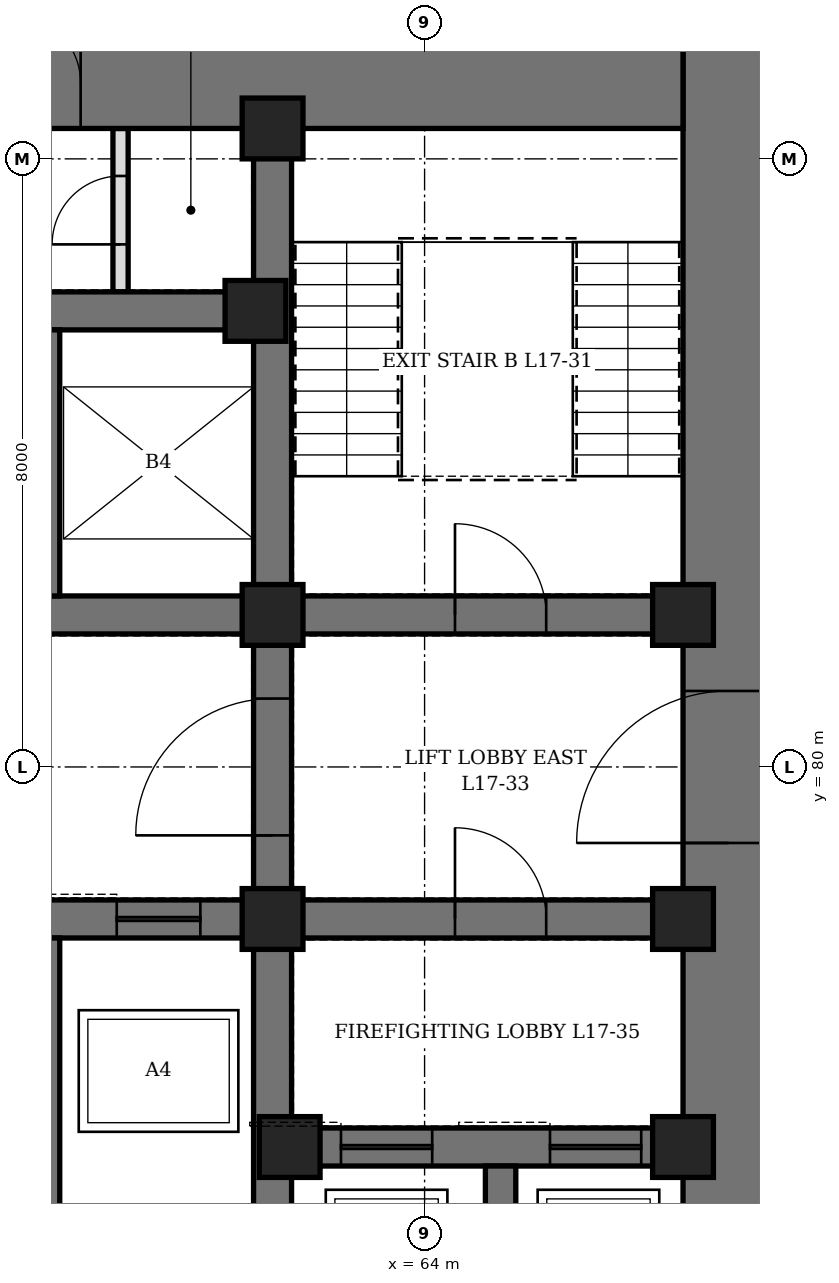
"""IFC4 building model, lengths in metres.
Left out: names, types, materials, properties, quantities, classifications, styles, units other than length and angle.
Written with IfcOpenShell. Run it as: python <this file> out.ifc"""

import sys

from ifc_helpers import new_model, si_unit, direction, frame, frame_2d, origin, origin_2d, place, context, subcontext, project, spatial, rectangle, hollow_rectangle, extrude, element, fill, save


model = new_model("IFC4")
c1 = context("Model", 3, precision=1e-05, world=origin(), true_north=direction((0.0, 1.0)))
c2 = subcontext(c1, "Body", "Model", "MODEL_VIEW")
j1 = project(units=[si_unit("LENGTHUNIT", "METRE"), si_unit("PLANEANGLEUNIT", "RADIAN")], contexts=[c1])
p1 = place(None, origin())
s1 = spatial("IfcSite", under=j1, at=p1, CompositionType="ELEMENT")
p2 = place(p1, origin())
s2 = spatial("IfcBuilding", under=s1, at=p2, CompositionType="ELEMENT")
p3 = place(p2, frame((0.0, 0.0, 81.1)))
s3 = spatial("IfcBuildingStorey", under=s2, at=p3, CompositionType="ELEMENT", Elevation=81.1)
p4 = place(p3, frame((68.0, 70.4, 0.0), z_axis=(0.0, 0.0, 1.0), x_axis=(0.0, 1.0, 0.0)))
e1 = element("IfcWall", 1, at=p4, inside=s3, PredefinedType="SHEAR", context=c2, shape_type="SweptSolid", body=[
    extrude(rectangle(XDim=19.2, YDim=1.2, at=frame_2d((9.6, 0.0))), origin(), (0.0, 0.0, 1.0), 4.2),
])
p5 = place(p4, frame((8.6, 0.0, 0.0)))
e2 = element("IfcOpeningElement", 2, at=p5, cuts=e1, PredefinedType="OPENING", context=c2, shape_type="SweptSolid", body=[
    extrude(rectangle(XDim=2.0, YDim=2.4, at=frame_2d((1.0, 1.2))), frame((0.0, 0.61, 0.0), z_axis=(0.0, -1.0, 0.0), x_axis=(1.0, 0.0, 0.0)), (0.0, 0.0, 1.0), 1.22),
])
p6 = place(p3, frame((44.6, 89.0, 0.0), z_axis=(0.0, 0.0, 1.0), x_axis=(1.0, 0.0, 0.0)))
e3 = element("IfcWall", 3, at=p6, inside=s3, PredefinedType="SHEAR", context=c2, shape_type="SweptSolid", body=[
    extrude(rectangle(XDim=22.8, YDim=1.2, at=frame_2d((11.4, 0.0))), origin(), (0.0, 0.0, 1.0), 4.2),
])
p7 = place(p6, frame((6.55, 0.0, 0.0)))
e4 = element("IfcOpeningElement", 4, at=p7, cuts=e3, PredefinedType="OPENING", context=c2, shape_type="SweptSolid", body=[
    extrude(rectangle(XDim=1.0, YDim=2.1, at=frame_2d((0.5, 1.05))), frame((0.0, 0.61, 0.0), z_axis=(0.0, -1.0, 0.0), x_axis=(1.0, 0.0, 0.0)), (0.0, 0.0, 1.0), 1.22),
])
p8 = place(p6, frame((9.45, 0.0, 0.0)))
e5 = element("IfcOpeningElement", 5, at=p8, cuts=e3, PredefinedType="OPENING", context=c2, shape_type="SweptSolid", body=[
    extrude(rectangle(XDim=0.9, YDim=2.1, at=frame_2d((0.45, 1.05))), frame((0.0, 0.61, 0.0), z_axis=(0.0, -1.0, 0.0), x_axis=(1.0, 0.0, 0.0)), (0.0, 0.0, 1.0), 1.22),
])
p9 = place(p6, frame((12.05, 0.0, 0.0)))
e6 = element("IfcOpeningElement", 6, at=p9, cuts=e3, PredefinedType="OPENING", context=c2, shape_type="SweptSolid", body=[
    extrude(rectangle(XDim=0.9, YDim=2.1, at=frame_2d((0.45, 1.05))), frame((0.0, 0.61, 0.0), z_axis=(0.0, -1.0, 0.0), x_axis=(1.0, 0.0, 0.0)), (0.0, 0.0, 1.0), 1.22),
])
p10 = place(p6, frame((13.975, 0.0, 0.0)))
e7 = element("IfcOpeningElement", 7, at=p10, cuts=e3, PredefinedType="OPENING", context=c2, shape_type="SweptSolid", body=[
    extrude(rectangle(XDim=0.9, YDim=2.1, at=frame_2d((0.45, 1.05))), frame((0.0, 0.61, 0.0), z_axis=(0.0, -1.0, 0.0), x_axis=(1.0, 0.0, 0.0)), (0.0, 0.0, 1.0), 1.22),
])
p11 = place(p3, frame((62.0, 71.6, 0.0), z_axis=(0.0, 0.0, 1.0), x_axis=(0.0, 1.0, 0.0)))
e8 = element("IfcWall", 8, at=p11, inside=s3, PredefinedType="SHEAR", context=c2, shape_type="SweptSolid", body=[
    extrude(rectangle(XDim=16.8, YDim=0.5, at=frame_2d((8.4, 0.0))), origin(), (0.0, 0.0, 1.0), 4.2),
])
p12 = place(p11, frame((7.5, 0.0, 0.0)))
e9 = element("IfcOpeningElement", 9, at=p12, cuts=e8, PredefinedType="OPENING", context=c2, shape_type="SweptSolid", body=[
    extrude(rectangle(XDim=1.8, YDim=2.4, at=frame_2d((0.9, 1.2))), frame((0.0, 0.26, 0.0), z_axis=(0.0, -1.0, 0.0), x_axis=(1.0, 0.0, 0.0)), (0.0, 0.0, 1.0), 0.52),
])
p13 = place(p3, frame((62.25, 75.0, 0.0), z_axis=(0.0, 0.0, 1.0), x_axis=(1.0, 0.0, 0.0)))
e10 = element("IfcWall", 10, at=p13, inside=s3, PredefinedType="SHEAR", context=c2, shape_type="SweptSolid", body=[
    extrude(rectangle(XDim=5.15, YDim=0.5, at=frame_2d((2.575, 0.0))), origin(), (0.0, 0.0, 1.0), 4.2),
])
p14 = place(p13, frame((0.65, 0.0, 0.0)))
e11 = element("IfcOpeningElement", 11, at=p14, cuts=e10, PredefinedType="OPENING", context=c2, shape_type="SweptSolid", body=[
    extrude(rectangle(XDim=1.2, YDim=2.2, at=frame_2d((0.6, 1.1))), frame((0.0, 0.26, 0.0), z_axis=(0.0, -1.0, 0.0), x_axis=(1.0, 0.0, 0.0)), (0.0, 0.0, 1.0), 0.52),
])
p15 = place(p13, frame((3.4, 0.0, 0.0)))
e12 = element("IfcOpeningElement", 12, at=p15, cuts=e10, PredefinedType="OPENING", context=c2, shape_type="SweptSolid", body=[
    extrude(rectangle(XDim=1.2, YDim=2.2, at=frame_2d((0.6, 1.1))), frame((0.0, 0.26, 0.0), z_axis=(0.0, -1.0, 0.0), x_axis=(1.0, 0.0, 0.0)), (0.0, 0.0, 1.0), 0.52),
])
p16 = place(p3, frame((62.25, 78.0, 0.0), z_axis=(0.0, 0.0, 1.0), x_axis=(1.0, 0.0, 0.0)))
e13 = element("IfcWall", 13, at=p16, inside=s3, PredefinedType="SHEAR", context=c2, shape_type="SweptSolid", body=[
    extrude(rectangle(XDim=5.15, YDim=0.5, at=frame_2d((2.575, 0.0))), origin(), (0.0, 0.0, 1.0), 4.2),
])
p17 = place(p16, frame((2.15, 0.0, 0.0)))
e14 = element("IfcOpeningElement", 14, at=p17, cuts=e13, PredefinedType="OPENING", context=c2, shape_type="SweptSolid", body=[
    extrude(rectangle(XDim=1.2, YDim=2.1, at=frame_2d((0.6, 1.05))), frame((0.0, 0.26, 0.0), z_axis=(0.0, -1.0, 0.0), x_axis=(1.0, 0.0, 0.0)), (0.0, 0.0, 1.0), 0.52),
])
p18 = place(p3, frame((62.25, 82.0, 0.0), z_axis=(0.0, 0.0, 1.0), x_axis=(1.0, 0.0, 0.0)))
e15 = element("IfcWall", 15, at=p18, inside=s3, PredefinedType="SHEAR", context=c2, shape_type="SweptSolid", body=[
    extrude(rectangle(XDim=5.15, YDim=0.5, at=frame_2d((2.575, 0.0))), origin(), (0.0, 0.0, 1.0), 4.2),
])
p19 = place(p18, frame((2.15, 0.0, 0.0)))
e16 = element("IfcOpeningElement", 16, at=p19, cuts=e15, PredefinedType="OPENING", context=c2, shape_type="SweptSolid", body=[
    extrude(rectangle(XDim=1.2, YDim=2.1, at=frame_2d((0.6, 1.05))), frame((0.0, 0.26, 0.0), z_axis=(0.0, -1.0, 0.0), x_axis=(1.0, 0.0, 0.0)), (0.0, 0.0, 1.0), 0.52),
])
p20 = place(p3, frame((50.25, 78.0, 0.0), z_axis=(0.0, 0.0, 1.0), x_axis=(1.0, 0.0, 0.0)))
e17 = element("IfcWall", 17, at=p20, inside=s3, PredefinedType="SHEAR", context=c2, shape_type="SweptSolid", body=[
    extrude(rectangle(XDim=11.5, YDim=0.5, at=frame_2d((5.75, 0.0))), origin(), (0.0, 0.0, 1.0), 4.2),
])
p21 = place(p20, frame((0.7, 0.0, 0.0)))
e18 = element("IfcOpeningElement", 18, at=p21, cuts=e17, PredefinedType="OPENING", context=c2, shape_type="SweptSolid", body=[
    extrude(rectangle(XDim=1.1, YDim=2.2, at=frame_2d((0.55, 1.1))), frame((0.0, 0.26, 0.0), z_axis=(0.0, -1.0, 0.0), x_axis=(1.0, 0.0, 0.0)), (0.0, 0.0, 1.0), 0.52),
])
p22 = place(p20, frame((3.7, 0.0, 0.0)))
e19 = element("IfcOpeningElement", 19, at=p22, cuts=e17, PredefinedType="OPENING", context=c2, shape_type="SweptSolid", body=[
    extrude(rectangle(XDim=1.1, YDim=2.2, at=frame_2d((0.55, 1.1))), frame((0.0, 0.26, 0.0), z_axis=(0.0, -1.0, 0.0), x_axis=(1.0, 0.0, 0.0)), (0.0, 0.0, 1.0), 0.52),
])
p23 = place(p20, frame((6.7, 0.0, 0.0)))
e20 = element("IfcOpeningElement", 20, at=p23, cuts=e17, PredefinedType="OPENING", context=c2, shape_type="SweptSolid", body=[
    extrude(rectangle(XDim=1.1, YDim=2.2, at=frame_2d((0.55, 1.1))), frame((0.0, 0.26, 0.0), z_axis=(0.0, -1.0, 0.0), x_axis=(1.0, 0.0, 0.0)), (0.0, 0.0, 1.0), 0.52),
])
p24 = place(p20, frame((9.7, 0.0, 0.0)))
e21 = element("IfcOpeningElement", 21, at=p24, cuts=e17, PredefinedType="OPENING", context=c2, shape_type="SweptSolid", body=[
    extrude(rectangle(XDim=1.1, YDim=2.2, at=frame_2d((0.55, 1.1))), frame((0.0, 0.26, 0.0), z_axis=(0.0, -1.0, 0.0), x_axis=(1.0, 0.0, 0.0)), (0.0, 0.0, 1.0), 0.52),
])
for number, where, z_axis, x_axis in (
    (22, (50.25, 82.0, 0.0), (0.0, 0.0, 1.0), (1.0, 0.0, 0.0)),
    (23, (50.25, 86.0, 0.0), (0.0, 0.0, 1.0), (1.0, 0.0, 0.0)),
):
    element("IfcWall", number, at=place(p3, frame(where, z_axis=z_axis, x_axis=x_axis)), inside=s3, PredefinedType="SHEAR", context=c2, shape_type="SweptSolid", body=[
        extrude(rectangle(XDim=11.5, YDim=0.5, at=frame_2d((5.75, 0.0))), origin(), (0.0, 0.0, 1.0), 4.2),
    ])
p25 = place(p3, frame((59.0, 74.2, 0.0), z_axis=(0.0, 0.0, 1.0), x_axis=(0.0, 1.0, 0.0)))
e24 = element("IfcWall", 24, at=p25, inside=s3, PredefinedType="SHEAR", context=c2, shape_type="SweptSolid", body=[
    extrude(rectangle(XDim=3.55, YDim=0.4, at=frame_2d((1.775, 0.0))), origin(), (0.0, 0.0, 1.0), 4.2),
])
p26 = place(p3, frame((59.0, 82.25, 0.0), z_axis=(0.0, 0.0, 1.0), x_axis=(0.0, 1.0, 0.0)))
e25 = element("IfcWall", 25, at=p26, inside=s3, PredefinedType="SHEAR", context=c2, shape_type="SweptSolid", body=[
    extrude(rectangle(XDim=3.5, YDim=0.4, at=frame_2d((1.75, 0.0))), origin(), (0.0, 0.0, 1.0), 4.2),
])
p27 = place(p3, frame((65.0, 71.6, 0.0), z_axis=(0.0, 0.0, 1.0), x_axis=(0.0, 1.0, 0.0)))
e26 = element("IfcWall", 26, at=p27, inside=s3, PredefinedType="SHEAR", context=c2, shape_type="SweptSolid", body=[
    extrude(rectangle(XDim=3.15, YDim=0.4, at=frame_2d((1.575, 0.0))), origin(), (0.0, 0.0, 1.0), 4.2),
])
for number, where, z_axis, x_axis in (
    (27, (61.775, 86.0, 0.0), (0.0, 0.0, 1.0), (1.0, 0.0, 0.0)),
    (28, (62.0, 78.0, 0.0), (0.0, 0.0, 1.0), (1.0, 0.0, 0.0)),
    (29, (62.0, 82.0, 0.0), (0.0, 0.0, 1.0), (1.0, 0.0, 0.0)),
    (30, (62.0, 88.4, 0.0), (0.0, 0.0, 1.0), (1.0, 0.0, 0.0)),
    (31, (62.225, 75.0, 0.0), (0.0, 0.0, 1.0), (1.0, 0.0, 0.0)),
    (32, (67.4, 75.0, 0.0), (0.0, 0.0, 1.0), (1.0, 0.0, 0.0)),
    (33, (67.4, 78.0, 0.0), (0.0, 0.0, 1.0), (1.0, 0.0, 0.0)),
    (34, (67.4, 82.0, 0.0), (0.0, 0.0, 1.0), (1.0, 0.0, 0.0)),
):
    element("IfcColumn", number, at=place(p3, frame(where, z_axis=z_axis, x_axis=x_axis)), inside=s3, PredefinedType="COLUMN", context=c2, shape_type="SweptSolid", body=[
        extrude(hollow_rectangle(XDim=0.8, YDim=0.8, WallThickness=0.1, at=origin_2d()), origin(), (0.0, 0.0, 1.0), 4.2),
    ])
p28 = place(p3, frame((60.0, 86.25, 0.0), z_axis=(0.0, 0.0, 1.0), x_axis=(0.0, 1.0, 0.0)))
e35 = element("IfcWall", 35, at=p28, inside=s3, PredefinedType="PARTITIONING", context=c2, shape_type="SweptSolid", body=[
    extrude(rectangle(XDim=2.15, YDim=0.2, at=frame_2d((1.075, 0.0))), origin(), (0.0, 0.0, 1.0), 4.04),
])
p29 = place(p28, frame((0.625, 0.0, 0.0)))
e36 = element("IfcOpeningElement", 36, at=p29, cuts=e35, PredefinedType="OPENING", context=c2, shape_type="SweptSolid", body=[
    extrude(rectangle(XDim=0.9, YDim=2.1, at=frame_2d((0.45, 1.05))), frame((0.0, 0.11, 0.0), z_axis=(0.0, -1.0, 0.0), x_axis=(1.0, 0.0, 0.0)), (0.0, 0.0, 1.0), 0.22),
])
p30 = place(p10, origin())
e37 = element("IfcDoor", 37, at=p30, inside=s3, OperationType="SINGLE_SWING_LEFT", PredefinedType="DOOR", context=c2, shape_type="SweptSolid", body=[
    extrude(rectangle(XDim=0.9, YDim=2.1, at=frame_2d((0.45, 1.05))), frame((0.0, 0.35, 0.0), z_axis=(0.0, -1.0, 0.0), x_axis=(1.0, 0.0, 0.0)), (0.0, 0.0, 1.0), 0.7),
])
fill(e7, e37)
p31 = place(p29, origin())
e38 = element("IfcDoor", 38, at=p31, inside=s3, OperationType="SINGLE_SWING_LEFT", PredefinedType="DOOR", context=c2, shape_type="SweptSolid", body=[
    extrude(rectangle(XDim=0.9, YDim=2.1, at=frame_2d((0.45, 1.05))), frame((0.0, 0.1, 0.0), z_axis=(0.0, -1.0, 0.0), x_axis=(1.0, 0.0, 0.0)), (0.0, 0.0, 1.0), 0.199),
])
fill(e36, e38)
p32 = place(p19, origin())
e39 = element("IfcDoor", 39, at=p32, inside=s3, OperationType="SINGLE_SWING_LEFT", PredefinedType="DOOR", context=c2, shape_type="SweptSolid", body=[
    extrude(rectangle(XDim=1.2, YDim=2.1, at=frame_2d((0.6, 1.05))), frame((0.0, 0.25, 0.0), z_axis=(0.0, -1.0, 0.0), x_axis=(1.0, 0.0, 0.0)), (0.0, 0.0, 1.0), 0.5),
])
fill(e16, e39)
p33 = place(p5, origin())
e40 = element("IfcDoor", 40, at=p33, inside=s3, OperationType="DOUBLE_DOOR_SINGLE_SWING", PredefinedType="DOOR", context=c2, shape_type="SweptSolid", body=[
    extrude(rectangle(XDim=2.0, YDim=2.4, at=frame_2d((1.0, 1.2))), frame((0.0, 0.35, 0.0), z_axis=(0.0, -1.0, 0.0), x_axis=(1.0, 0.0, 0.0)), (0.0, 0.0, 1.0), 0.7),
])
fill(e2, e40)
p34 = place(p12, origin())
e41 = element("IfcDoor", 41, at=p34, inside=s3, OperationType="DOUBLE_DOOR_SINGLE_SWING", PredefinedType="DOOR", context=c2, shape_type="SweptSolid", body=[
    extrude(rectangle(XDim=1.8, YDim=2.4, at=frame_2d((0.9, 1.2))), frame((0.0, 0.25, 0.0), z_axis=(0.0, -1.0, 0.0), x_axis=(1.0, 0.0, 0.0)), (0.0, 0.0, 1.0), 0.5),
])
fill(e9, e41)
p35 = place(p17, origin())
e42 = element("IfcDoor", 42, at=p35, inside=s3, OperationType="SINGLE_SWING_RIGHT", PredefinedType="DOOR", context=c2, shape_type="SweptSolid", body=[
    extrude(rectangle(XDim=1.2, YDim=2.1, at=frame_2d((0.6, 1.05))), frame((0.0, 0.25, 0.0), z_axis=(0.0, -1.0, 0.0), x_axis=(1.0, 0.0, 0.0)), (0.0, 0.0, 1.0), 0.5),
])
fill(e14, e42)
p36 = place(p24, origin())
e43 = element("IfcDoor", 43, at=p36, inside=s3, OperationType="SLIDING_TO_LEFT", PredefinedType="DOOR", context=c2, shape_type="SweptSolid", body=[
    extrude(rectangle(XDim=1.1, YDim=2.2, at=frame_2d((0.55, 1.1))), frame((0.0, 0.25, 0.0), z_axis=(0.0, -1.0, 0.0), x_axis=(1.0, 0.0, 0.0)), (0.0, 0.0, 1.0), 0.5),
])
fill(e21, e43)
p37 = place(p14, origin())
e44 = element("IfcDoor", 44, at=p37, inside=s3, OperationType="SLIDING_TO_LEFT", PredefinedType="DOOR", context=c2, shape_type="SweptSolid", body=[
    extrude(rectangle(XDim=1.2, YDim=2.2, at=frame_2d((0.6, 1.1))), frame((0.0, 0.25, 0.0), z_axis=(0.0, -1.0, 0.0), x_axis=(1.0, 0.0, 0.0)), (0.0, 0.0, 1.0), 0.5),
])
fill(e11, e44)
p38 = place(p15, origin())
e45 = element("IfcDoor", 45, at=p38, inside=s3, OperationType="SLIDING_TO_LEFT", PredefinedType="DOOR", context=c2, shape_type="SweptSolid", body=[
    extrude(rectangle(XDim=1.2, YDim=2.2, at=frame_2d((0.6, 1.1))), frame((0.0, 0.25, 0.0), z_axis=(0.0, -1.0, 0.0), x_axis=(1.0, 0.0, 0.0)), (0.0, 0.0, 1.0), 0.5),
])
fill(e12, e45)
save(model, sys.argv[1])
